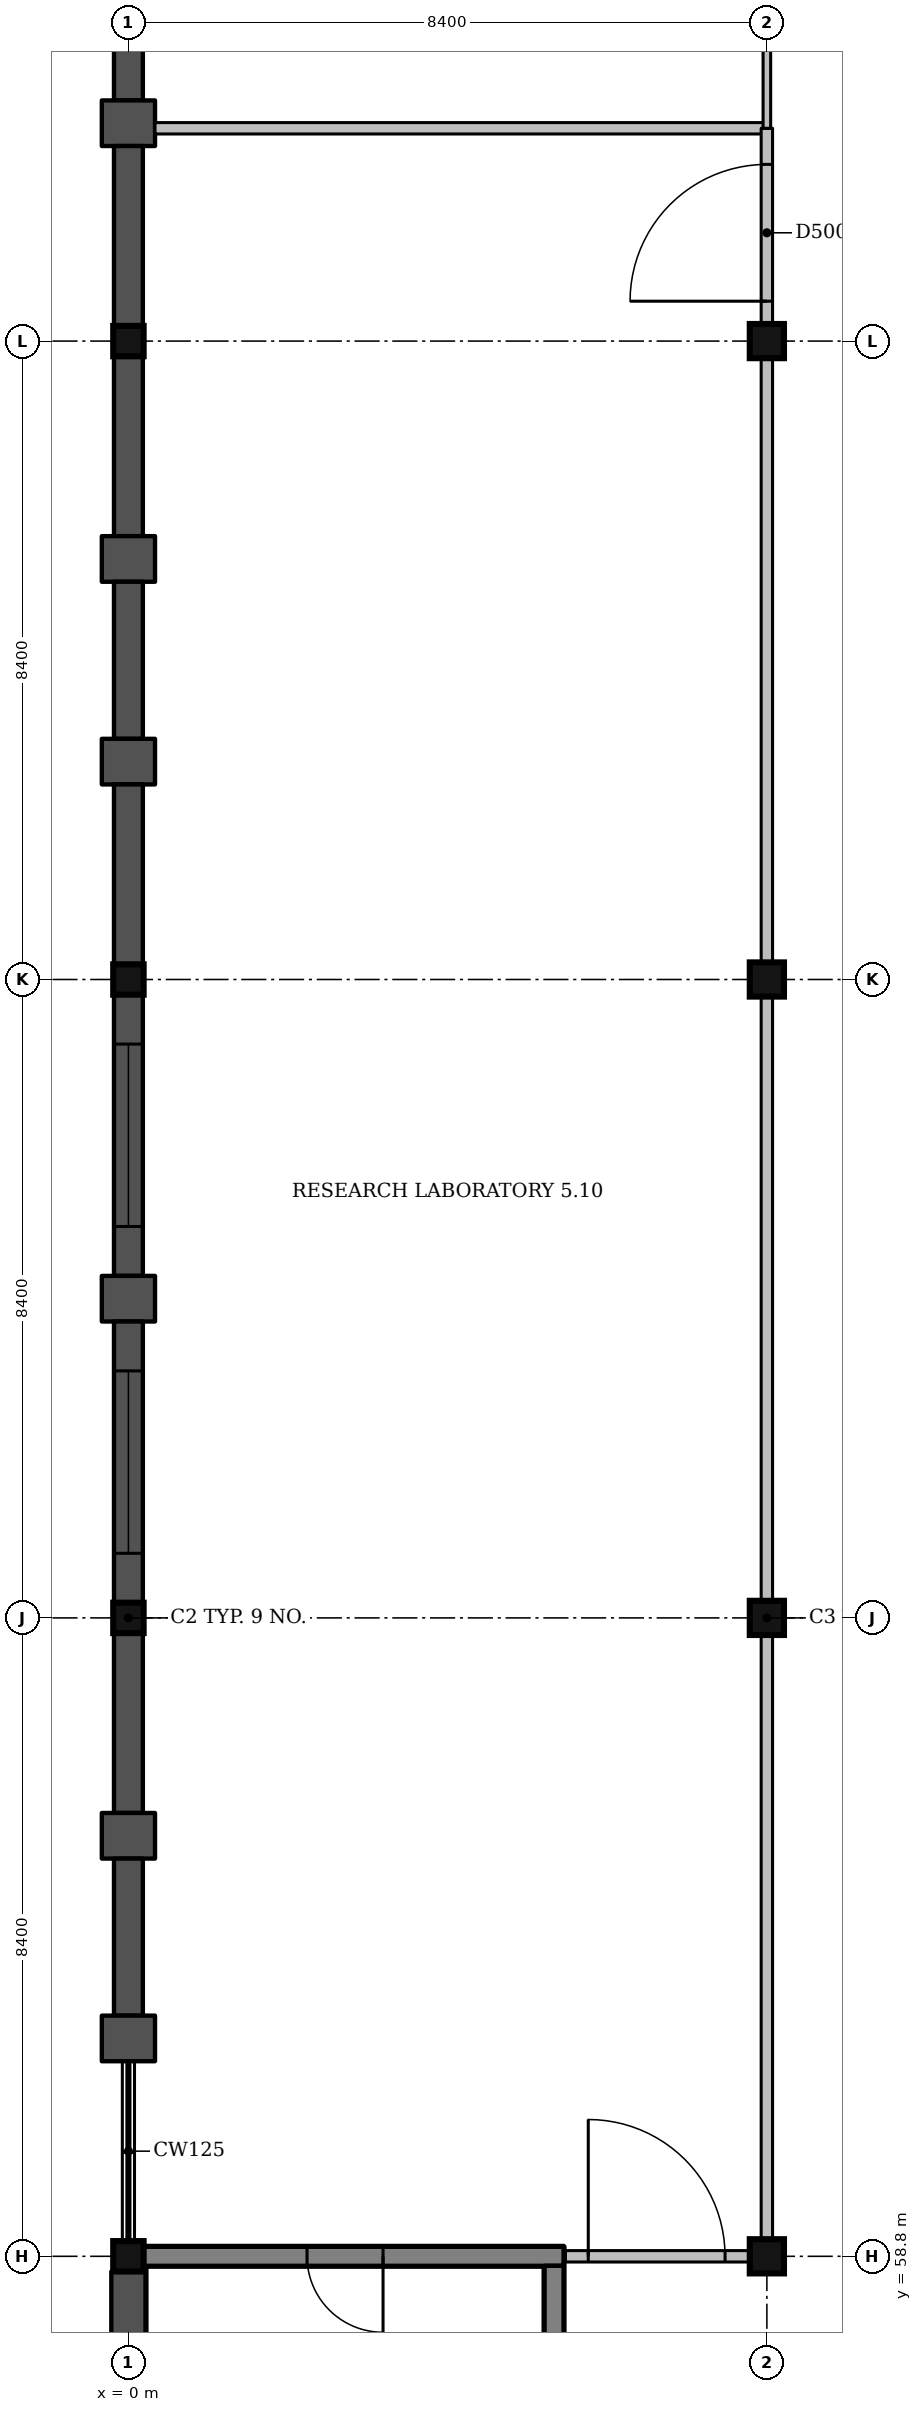
"""IFC4 building model, lengths in metres.
Left out: names, types, materials, properties, quantities, classifications, styles, units other than length and angle.
Written with IfcOpenShell. Run it as: python <this file> out.ifc"""

import sys

from ifc_helpers import new_model, si_unit, direction, frame, frame_2d, origin, origin_2d, place, context, subcontext, project, spatial, rectangle, extrude, element, fill, save


model = new_model("IFC4")
c1 = context("Model", 3, precision=1e-05, world=origin(), true_north=direction((0.0, 1.0)))
c2 = subcontext(c1, "Body", "Model", "MODEL_VIEW")
j1 = project(units=[si_unit("LENGTHUNIT", "METRE"), si_unit("PLANEANGLEUNIT", "RADIAN")], contexts=[c1])
p1 = place(None, origin())
s1 = spatial("IfcSite", under=j1, at=p1, CompositionType="ELEMENT")
p2 = place(p1, origin())
s2 = spatial("IfcBuilding", under=s1, at=p2, CompositionType="ELEMENT")
p3 = place(p2, frame((0.0, 0.0, 22.5)))
s3 = spatial("IfcBuildingStorey", under=s2, at=p3, CompositionType="ELEMENT", Elevation=22.5)
for number, where, z_axis, x_axis in (
    (1, (0.0, 58.8, 0.0), (0.0, 0.0, 1.0), (1.0, 0.0, 0.0)),
    (2, (0.0, 67.2, 0.0), (0.0, 0.0, 1.0), (1.0, 0.0, 0.0)),
    (3, (0.0, 75.6, 0.0), (0.0, 0.0, 1.0), (1.0, 0.0, 0.0)),
    (4, (0.0, 84.0, 0.0), (0.0, 0.0, 1.0), (1.0, 0.0, 0.0)),
):
    element("IfcColumn", number, at=place(p3, frame(where, z_axis=z_axis, x_axis=x_axis)), inside=s3, PredefinedType="COLUMN", context=c2, shape_type="SweptSolid", body=[
        extrude(rectangle(XDim=0.4, YDim=0.4, at=origin_2d()), origin(), (0.0, 0.0, 1.0), 4.5),
    ])
for number, where, z_axis, x_axis in (
    (5, (8.4, 58.8, 0.0), (0.0, 0.0, 1.0), (1.0, 0.0, 0.0)),
    (6, (8.4, 67.2, 0.0), (0.0, 0.0, 1.0), (1.0, 0.0, 0.0)),
    (7, (8.4, 75.6, 0.0), (0.0, 0.0, 1.0), (1.0, 0.0, 0.0)),
    (8, (8.4, 84.0, 0.0), (0.0, 0.0, 1.0), (1.0, 0.0, 0.0)),
):
    element("IfcColumn", number, at=place(p3, frame(where, z_axis=z_axis, x_axis=x_axis)), inside=s3, PredefinedType="COLUMN", context=c2, shape_type="SweptSolid", body=[
        extrude(rectangle(XDim=0.45, YDim=0.45, at=origin_2d()), origin(), (0.0, 0.0, 1.0), 4.5),
    ])
p4 = place(p3, frame((0.2, 58.8, 0.0), z_axis=(0.0, 0.0, 1.0), x_axis=(1.0, 0.0, 0.0)))
e9 = element("IfcWall", 9, at=p4, inside=s3, PredefinedType="SHEAR", context=c2, shape_type="SweptSolid", body=[
    extrude(rectangle(XDim=5.525, YDim=0.25, at=frame_2d((2.763, 0.0))), origin(), (0.0, 0.0, 1.0), 4.5),
])
p5 = place(p4, frame((2.15, 0.0, 0.0)))
e10 = element("IfcOpeningElement", 10, at=p5, cuts=e9, PredefinedType="OPENING", context=c2, shape_type="SweptSolid", body=[
    extrude(rectangle(XDim=1.0, YDim=2.1, at=frame_2d((0.5, 1.05))), frame((0.0, 0.135, 0.0), z_axis=(0.0, -1.0, 0.0), x_axis=(1.0, 0.0, 0.0)), (0.0, 0.0, 1.0), 0.27),
])
p6 = place(p3, frame((5.6, 54.61, 0.0), z_axis=(0.0, 0.0, 1.0), x_axis=(0.0, 1.0, 0.0)))
e11 = element("IfcWall", 11, at=p6, inside=s3, PredefinedType="SHEAR", context=c2, shape_type="SweptSolid", body=[
    extrude(rectangle(XDim=4.065, YDim=0.25, at=frame_2d((2.032, 0.0))), origin(), (0.0, 0.0, 1.0), 4.5),
])
p7 = place(p3, frame((0.0, 89.233, 0.0), z_axis=(0.0, 0.0, 1.0), x_axis=(0.0, -1.0, 0.0)))
e12 = element("IfcWall", 12, at=p7, inside=s3, PredefinedType="SOLIDWALL", context=c2, shape_type="SweptSolid", body=[
    extrude(rectangle(XDim=2.067, YDim=0.38, at=frame_2d((1.033, 0.0))), origin(), (0.0, 0.0, 1.0), 3.35),
])
p8 = place(p7, frame((0.733, 0.0, 1.5)))
e13 = element("IfcOpeningElement", 13, at=p8, cuts=e12, PredefinedType="OPENING", context=c2, shape_type="SweptSolid", body=[
    extrude(rectangle(XDim=0.6, YDim=1.2, at=frame_2d((0.3, 0.6))), frame((0.0, 0.2, 0.0), z_axis=(0.0, -1.0, 0.0), x_axis=(1.0, 0.0, 0.0)), (0.0, 0.0, 1.0), 0.4),
])
p9 = place(p3, frame((0.0, 87.167, 0.0), z_axis=(0.0, 0.0, 1.0), x_axis=(0.0, -1.0, 0.0)))
e14 = element("IfcWall", 14, at=p9, inside=s3, PredefinedType="SOLIDWALL", context=c2, shape_type="SweptSolid", body=[
    extrude(rectangle(XDim=0.6, YDim=0.7, at=frame_2d((0.3, 0.0))), origin(), (0.0, 0.0, 1.0), 3.35),
])
for number, where, z_axis, x_axis in (
    (15, (0.0, 86.567, 0.0), (0.0, 0.0, 1.0), (0.0, -1.0, 0.0)),
    (16, (0.0, 83.8, 0.0), (0.0, 0.0, 1.0), (0.0, -1.0, 0.0)),
):
    element("IfcWall", number, at=place(p3, frame(where, z_axis=z_axis, x_axis=x_axis)), inside=s3, PredefinedType="SOLIDWALL", context=c2, shape_type="SweptSolid", body=[
        extrude(rectangle(XDim=2.367, YDim=0.38, at=frame_2d((1.183, 0.0))), origin(), (0.0, 0.0, 1.0), 3.35),
    ])
p10 = place(p3, frame((0.0, 81.433, 0.0), z_axis=(0.0, 0.0, 1.0), x_axis=(0.0, -1.0, 0.0)))
e17 = element("IfcWall", 17, at=p10, inside=s3, PredefinedType="SOLIDWALL", context=c2, shape_type="SweptSolid", body=[
    extrude(rectangle(XDim=0.6, YDim=0.7, at=frame_2d((0.3, 0.0))), origin(), (0.0, 0.0, 1.0), 3.35),
])
p11 = place(p3, frame((0.0, 80.833, 0.0), z_axis=(0.0, 0.0, 1.0), x_axis=(0.0, -1.0, 0.0)))
e18 = element("IfcWall", 18, at=p11, inside=s3, PredefinedType="SOLIDWALL", context=c2, shape_type="SweptSolid", body=[
    extrude(rectangle(XDim=2.067, YDim=0.38, at=frame_2d((1.033, 0.0))), origin(), (0.0, 0.0, 1.0), 3.35),
])
p12 = place(p3, frame((0.0, 78.767, 0.0), z_axis=(0.0, 0.0, 1.0), x_axis=(0.0, -1.0, 0.0)))
e19 = element("IfcWall", 19, at=p12, inside=s3, PredefinedType="SOLIDWALL", context=c2, shape_type="SweptSolid", body=[
    extrude(rectangle(XDim=0.6, YDim=0.7, at=frame_2d((0.3, 0.0))), origin(), (0.0, 0.0, 1.0), 3.35),
])
p13 = place(p3, frame((0.0, 78.167, 0.0), z_axis=(0.0, 0.0, 1.0), x_axis=(0.0, -1.0, 0.0)))
e20 = element("IfcWall", 20, at=p13, inside=s3, PredefinedType="SOLIDWALL", context=c2, shape_type="SweptSolid", body=[
    extrude(rectangle(XDim=2.367, YDim=0.38, at=frame_2d((1.183, 0.0))), origin(), (0.0, 0.0, 1.0), 3.35),
])
p14 = place(p3, frame((0.0, 75.4, 0.0), z_axis=(0.0, 0.0, 1.0), x_axis=(0.0, -1.0, 0.0)))
e21 = element("IfcWall", 21, at=p14, inside=s3, PredefinedType="SOLIDWALL", context=c2, shape_type="SweptSolid", body=[
    extrude(rectangle(XDim=3.7, YDim=0.38, at=frame_2d((1.85, 0.0))), origin(), (0.0, 0.0, 1.0), 3.35),
])
p15 = place(p14, frame((0.65, 0.0, 1.2)))
e22 = element("IfcOpeningElement", 22, at=p15, cuts=e21, PredefinedType="OPENING", context=c2, shape_type="SweptSolid", body=[
    extrude(rectangle(XDim=2.4, YDim=1.5, at=frame_2d((1.2, 0.75))), frame((0.0, 0.2, 0.0), z_axis=(0.0, -1.0, 0.0), x_axis=(1.0, 0.0, 0.0)), (0.0, 0.0, 1.0), 0.4),
])
p16 = place(p3, frame((0.0, 71.7, 0.0), z_axis=(0.0, 0.0, 1.0), x_axis=(0.0, -1.0, 0.0)))
e23 = element("IfcWall", 23, at=p16, inside=s3, PredefinedType="SOLIDWALL", context=c2, shape_type="SweptSolid", body=[
    extrude(rectangle(XDim=0.6, YDim=0.7, at=frame_2d((0.3, 0.0))), origin(), (0.0, 0.0, 1.0), 3.35),
])
p17 = place(p3, frame((0.0, 71.1, 0.0), z_axis=(0.0, 0.0, 1.0), x_axis=(0.0, -1.0, 0.0)))
e24 = element("IfcWall", 24, at=p17, inside=s3, PredefinedType="SOLIDWALL", context=c2, shape_type="SweptSolid", body=[
    extrude(rectangle(XDim=3.7, YDim=0.38, at=frame_2d((1.85, 0.0))), origin(), (0.0, 0.0, 1.0), 3.35),
])
p18 = place(p17, frame((0.65, 0.0, 1.2)))
e25 = element("IfcOpeningElement", 25, at=p18, cuts=e24, PredefinedType="OPENING", context=c2, shape_type="SweptSolid", body=[
    extrude(rectangle(XDim=2.4, YDim=1.5, at=frame_2d((1.2, 0.75))), frame((0.0, 0.2, 0.0), z_axis=(0.0, -1.0, 0.0), x_axis=(1.0, 0.0, 0.0)), (0.0, 0.0, 1.0), 0.4),
])
p19 = place(p3, frame((0.0, 67.0, 0.0), z_axis=(0.0, 0.0, 1.0), x_axis=(0.0, -1.0, 0.0)))
e26 = element("IfcWall", 26, at=p19, inside=s3, PredefinedType="SOLIDWALL", context=c2, shape_type="SweptSolid", body=[
    extrude(rectangle(XDim=2.367, YDim=0.38, at=frame_2d((1.183, 0.0))), origin(), (0.0, 0.0, 1.0), 3.35),
])
p20 = place(p3, frame((0.0, 64.633, 0.0), z_axis=(0.0, 0.0, 1.0), x_axis=(0.0, -1.0, 0.0)))
e27 = element("IfcWall", 27, at=p20, inside=s3, PredefinedType="SOLIDWALL", context=c2, shape_type="SweptSolid", body=[
    extrude(rectangle(XDim=0.6, YDim=0.7, at=frame_2d((0.3, 0.0))), origin(), (0.0, 0.0, 1.0), 3.35),
])
p21 = place(p3, frame((0.0, 64.033, 0.0), z_axis=(0.0, 0.0, 1.0), x_axis=(0.0, -1.0, 0.0)))
e28 = element("IfcWall", 28, at=p21, inside=s3, PredefinedType="SOLIDWALL", context=c2, shape_type="SweptSolid", body=[
    extrude(rectangle(XDim=2.066, YDim=0.38, at=frame_2d((1.033, 0.0))), origin(), (0.0, 0.0, 1.0), 3.35),
])
p22 = place(p3, frame((0.0, 61.967, 0.0), z_axis=(0.0, 0.0, 1.0), x_axis=(0.0, -1.0, 0.0)))
e29 = element("IfcWall", 29, at=p22, inside=s3, PredefinedType="SOLIDWALL", context=c2, shape_type="SweptSolid", body=[
    extrude(rectangle(XDim=0.6, YDim=0.7, at=frame_2d((0.3, 0.0))), origin(), (0.0, 0.0, 1.0), 3.35),
])
p23 = place(p3, frame((0.0, 58.6, 0.0), z_axis=(0.0, 0.0, 1.0), x_axis=(0.0, -1.0, 0.0)))
e30 = element("IfcWall", 30, at=p23, inside=s3, PredefinedType="SOLIDWALL", context=c2, shape_type="SweptSolid", body=[
    extrude(rectangle(XDim=3.7, YDim=0.45, at=frame_2d((1.85, 0.0))), origin(), (0.0, 0.0, 1.0), 4.5),
])
p24 = place(p3, frame((5.75, 58.8, 0.0), z_axis=(0.0, 0.0, 1.0), x_axis=(1.0, 0.0, 0.0)))
e31 = element("IfcWall", 31, at=p24, inside=s3, PredefinedType="PARTITIONING", context=c2, shape_type="SweptSolid", body=[
    extrude(rectangle(XDim=2.425, YDim=0.15, at=frame_2d((1.212, 0.0))), origin(), (0.0, 0.0, 1.0), 3.4),
])
p25 = place(p24, frame((0.3, 0.0, 0.0)))
e32 = element("IfcOpeningElement", 32, at=p25, cuts=e31, PredefinedType="OPENING", context=c2, shape_type="SweptSolid", body=[
    extrude(rectangle(XDim=1.8, YDim=2.1, at=frame_2d((0.9, 1.05))), frame((0.0, 0.085, 0.0), z_axis=(0.0, -1.0, 0.0), x_axis=(1.0, 0.0, 0.0)), (0.0, 0.0, 1.0), 0.17),
])
p26 = place(p3, frame((0.35, 86.8, 0.0), z_axis=(0.0, 0.0, 1.0), x_axis=(1.0, 0.0, 0.0)))
e33 = element("IfcWall", 33, at=p26, inside=s3, PredefinedType="PARTITIONING", context=c2, shape_type="SweptSolid", body=[
    extrude(rectangle(XDim=8.05, YDim=0.15, at=frame_2d((4.025, 0.0))), origin(), (0.0, 0.0, 1.0), 3.4),
])
p27 = place(p3, frame((8.4, 59.025, 0.0), z_axis=(0.0, 0.0, 1.0), x_axis=(0.0, 1.0, 0.0)))
e34 = element("IfcWall", 34, at=p27, inside=s3, PredefinedType="PARTITIONING", context=c2, shape_type="SweptSolid", body=[
    extrude(rectangle(XDim=7.95, YDim=0.15, at=frame_2d((3.975, 0.0))), origin(), (0.0, 0.0, 1.0), 3.4),
])
for number, where, z_axis, x_axis in (
    (35, (8.4, 67.425, 0.0), (0.0, 0.0, 1.0), (0.0, 1.0, 0.0)),
    (36, (8.4, 75.825, 0.0), (0.0, 0.0, 1.0), (0.0, 1.0, 0.0)),
):
    element("IfcWall", number, at=place(p3, frame(where, z_axis=z_axis, x_axis=x_axis)), inside=s3, PredefinedType="PARTITIONING", context=c2, shape_type="SweptSolid", body=[
        extrude(rectangle(XDim=7.95, YDim=0.15, at=frame_2d((3.975, 0.0))), origin(), (0.0, 0.0, 1.0), 3.4),
    ])
p28 = place(p3, frame((8.4, 84.225, 0.0), z_axis=(0.0, 0.0, 1.0), x_axis=(0.0, 1.0, 0.0)))
e37 = element("IfcWall", 37, at=p28, inside=s3, PredefinedType="PARTITIONING", context=c2, shape_type="SweptSolid", body=[
    extrude(rectangle(XDim=2.575, YDim=0.15, at=frame_2d((1.288, 0.0))), origin(), (0.0, 0.0, 1.0), 3.4),
])
p29 = place(p28, frame((0.3, 0.0, 0.0)))
e38 = element("IfcOpeningElement", 38, at=p29, cuts=e37, PredefinedType="OPENING", context=c2, shape_type="SweptSolid", body=[
    extrude(rectangle(XDim=1.8, YDim=2.1, at=frame_2d((0.9, 1.05))), frame((0.0, 0.085, 0.0), z_axis=(0.0, -1.0, 0.0), x_axis=(1.0, 0.0, 0.0)), (0.0, 0.0, 1.0), 0.17),
])
p30 = place(p3, frame((8.4, 86.8, 0.0), z_axis=(0.0, 0.0, 1.0), x_axis=(0.0, 1.0, 0.0)))
e39 = element("IfcWall", 39, at=p30, inside=s3, PredefinedType="PARTITIONING", context=c2, shape_type="SweptSolid", body=[
    extrude(rectangle(XDim=5.375, YDim=0.1, at=frame_2d((2.688, 0.0))), origin(), (0.0, 0.0, 1.0), 3.4),
])
p31 = place(p30, frame((1.7, 0.0, 0.0)))
e40 = element("IfcOpeningElement", 40, at=p31, cuts=e39, PredefinedType="OPENING", context=c2, shape_type="SweptSolid", body=[
    extrude(rectangle(XDim=0.9, YDim=2.1, at=frame_2d((0.45, 1.05))), frame((0.0, 0.06, 0.0), z_axis=(0.0, -1.0, 0.0), x_axis=(1.0, 0.0, 0.0)), (0.0, 0.0, 1.0), 0.12),
])
p32 = place(p15, origin())
e41 = element("IfcWindow", 41, at=p32, inside=s3, PartitioningType="SINGLE_PANEL", PredefinedType="WINDOW", context=c2, shape_type="SweptSolid", body=[
    extrude(rectangle(XDim=2.4, YDim=1.5, at=frame_2d((1.2, 0.75))), frame((0.0, 0.15, 0.0), z_axis=(0.0, -1.0, 0.0), x_axis=(1.0, 0.0, 0.0)), (0.0, 0.0, 1.0), 0.06),
])
fill(e22, e41)
p33 = place(p18, origin())
e42 = element("IfcWindow", 42, at=p33, inside=s3, PartitioningType="SINGLE_PANEL", PredefinedType="WINDOW", context=c2, shape_type="SweptSolid", body=[
    extrude(rectangle(XDim=2.4, YDim=1.5, at=frame_2d((1.2, 0.75))), frame((0.0, 0.15, 0.0), z_axis=(0.0, -1.0, 0.0), x_axis=(1.0, 0.0, 0.0)), (0.0, 0.0, 1.0), 0.06),
])
fill(e25, e42)
p34 = place(p25, origin())
e43 = element("IfcDoor", 43, at=p34, inside=s3, OperationType="DOUBLE_DOOR_SINGLE_SWING", PredefinedType="DOOR", context=c2, shape_type="SweptSolid", body=[
    extrude(rectangle(XDim=1.8, YDim=2.1, at=frame_2d((0.9, 1.05))), frame((0.0, 0.025, 0.0), z_axis=(0.0, -1.0, 0.0), x_axis=(1.0, 0.0, 0.0)), (0.0, 0.0, 1.0), 0.05),
])
fill(e32, e43)
p35 = place(p29, origin())
e44 = element("IfcDoor", 44, at=p35, inside=s3, OperationType="DOUBLE_DOOR_SINGLE_SWING", PredefinedType="DOOR", context=c2, shape_type="SweptSolid", body=[
    extrude(rectangle(XDim=1.8, YDim=2.1, at=frame_2d((0.9, 1.05))), frame((0.0, 0.025, 0.0), z_axis=(0.0, -1.0, 0.0), x_axis=(1.0, 0.0, 0.0)), (0.0, 0.0, 1.0), 0.05),
])
fill(e38, e44)
p36 = place(p5, origin())
e45 = element("IfcDoor", 45, at=p36, inside=s3, OperationType="SINGLE_SWING_RIGHT", PredefinedType="DOOR", context=c2, shape_type="SweptSolid", body=[
    extrude(rectangle(XDim=1.0, YDim=2.1, at=frame_2d((0.5, 1.05))), frame((0.0, 0.025, 0.0), z_axis=(0.0, -1.0, 0.0), x_axis=(1.0, 0.0, 0.0)), (0.0, 0.0, 1.0), 0.05),
])
fill(e10, e45)
save(model, sys.argv[1])
